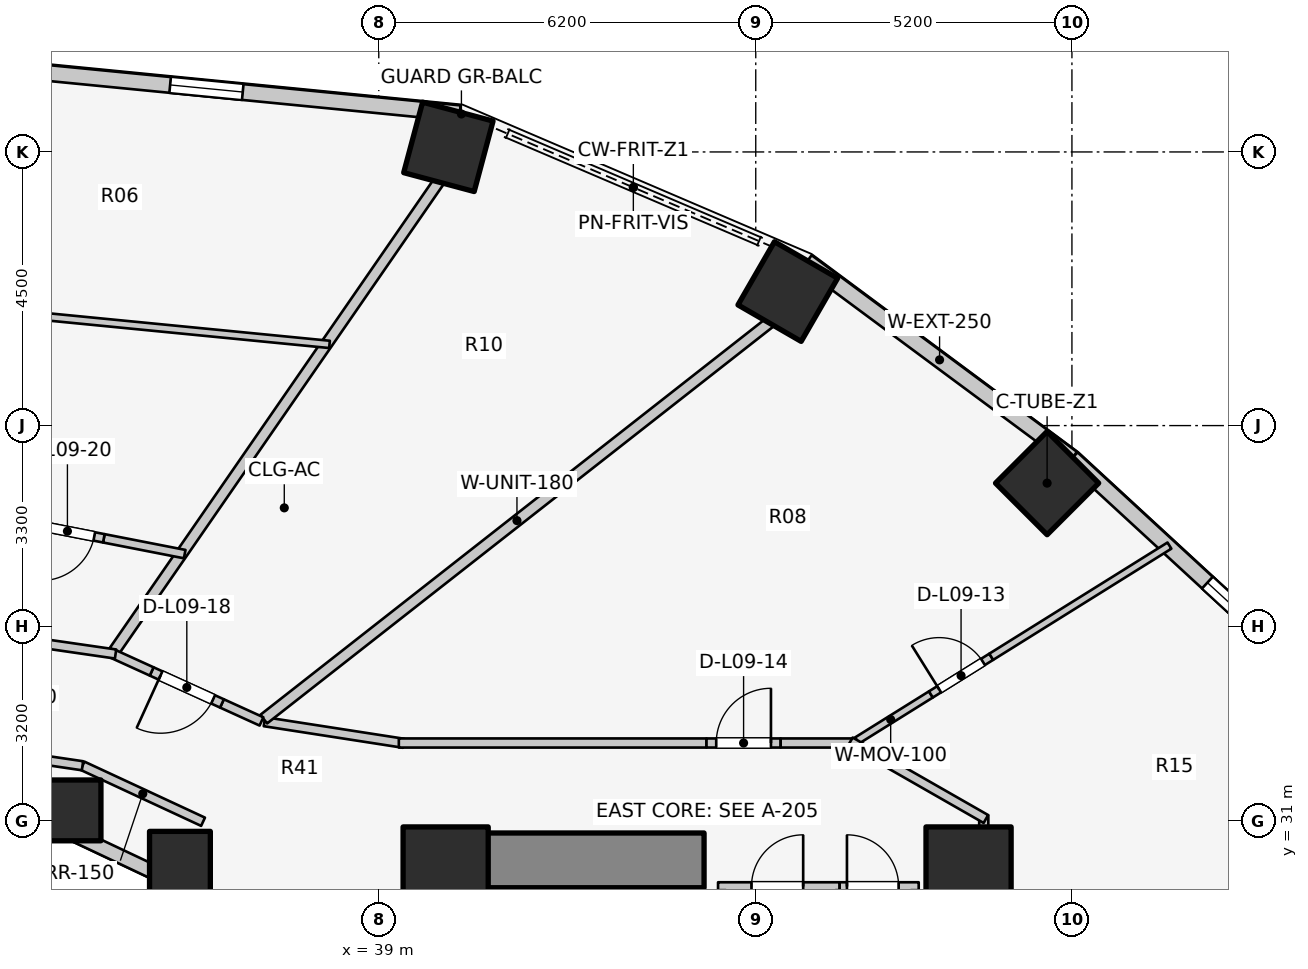
"""IFC4 building model, lengths in metres.
Left out: names, types, materials, properties, quantities, classifications, styles, units other than length and angle.
Written with IfcOpenShell. Run it as: python <this file> out.ifc"""

import sys

from ifc_helpers import new_model, si_unit, direction, frame, frame_2d, origin, origin_2d, place, context, subcontext, project, spatial, rectangle, extrude, element, fill, save


model = new_model("IFC4")
c1 = context("Model", 3, precision=1e-05, world=origin(), true_north=direction((0.0, 1.0)))
c2 = subcontext(c1, "Body", "Model", "MODEL_VIEW")
j1 = project(units=[si_unit("LENGTHUNIT", "METRE"), si_unit("PLANEANGLEUNIT", "RADIAN")], contexts=[c1])
p1 = place(None, origin())
s1 = spatial("IfcSite", under=j1, at=p1, CompositionType="ELEMENT")
p2 = place(p1, origin())
s2 = spatial("IfcBuilding", under=s1, at=p2, CompositionType="ELEMENT")
p3 = place(p2, frame((0.0, 0.0, 33.8)))
s3 = spatial("IfcBuildingStorey", under=s2, at=p3, CompositionType="ELEMENT", Elevation=33.8)
p4 = place(p3, frame((39.85, 30.35, 0.0), z_axis=(0.0, 0.0, 1.0), x_axis=(1.0, 0.0, 0.0)))
e1 = element("IfcWall", 1, at=p4, inside=s3, PredefinedType="SHEAR", context=c2, shape_type="SweptSolid", body=[
    extrude(rectangle(XDim=4.5, YDim=0.9, at=frame_2d((2.25, 0.0))), origin(), (0.0, 0.0, 1.0), 3.1),
])
for number, where, z_axis, x_axis in (
    (2, (48.7, 30.2, 0.0), (0.0, 0.0, 1.0), (1.0, 0.0, 0.0)),
    (3, (40.1, 30.2, 0.0), (0.0, 0.0, 1.0), (1.0, 0.0, 0.0)),
):
    element("IfcColumn", number, at=place(p3, frame(where, z_axis=z_axis, x_axis=x_axis)), inside=s3, PredefinedType="COLUMN", context=c2, shape_type="SweptSolid", body=[
        extrude(rectangle(XDim=1.4, YDim=1.4, at=origin_2d()), origin(), (0.0, 0.0, 1.0), 3.1),
    ])
p5 = place(p3, frame((49.992, 36.554, 0.0), z_axis=(0.0, 0.0, 1.0), x_axis=(0.707106781187, 0.707106781187, 0.0)))
e4 = element("IfcColumn", 4, at=p5, inside=s3, PredefinedType="COLUMN", context=c2, shape_type="SweptSolid", body=[
    extrude(rectangle(XDim=1.2, YDim=1.2, at=origin_2d()), origin(), (0.0, 0.0, 1.0), 3.1),
])
p6 = place(p3, frame((35.73, 30.327, 0.0), z_axis=(0.0, 0.0, 1.0), x_axis=(1.0, 0.0, 0.0)))
e5 = element("IfcColumn", 5, at=p6, inside=s3, PredefinedType="COLUMN", context=c2, shape_type="SweptSolid", body=[
    extrude(rectangle(XDim=1.0, YDim=1.0, at=origin_2d()), origin(), (0.0, 0.0, 1.0), 3.1),
])
p7 = place(p3, frame((45.727, 39.704, 0.0), z_axis=(0.0, 0.0, 1.0), x_axis=(0.5, 0.866025403784, 0.0)))
e6 = element("IfcColumn", 6, at=p7, inside=s3, PredefinedType="COLUMN", context=c2, shape_type="SweptSolid", body=[
    extrude(rectangle(XDim=1.2, YDim=1.2, at=origin_2d()), origin(), (0.0, 0.0, 1.0), 3.1),
])
p8 = place(p3, frame((33.931, 31.172, 0.0), z_axis=(0.0, 0.0, 1.0), x_axis=(1.0, 0.0, 0.0)))
e7 = element("IfcColumn", 7, at=p8, inside=s3, PredefinedType="COLUMN", context=c2, shape_type="SweptSolid", body=[
    extrude(rectangle(XDim=1.0, YDim=1.0, at=origin_2d()), origin(), (0.0, 0.0, 1.0), 3.1),
])
p9 = place(p3, frame((40.145, 42.084, 0.0), z_axis=(0.0, 0.0, 1.0), x_axis=(0.258819045103, 0.965925826289, 0.0)))
e8 = element("IfcColumn", 8, at=p9, inside=s3, PredefinedType="COLUMN", context=c2, shape_type="SweptSolid", body=[
    extrude(rectangle(XDim=1.2, YDim=1.2, at=origin_2d()), origin(), (0.0, 0.0, 1.0), 3.1),
])
p10 = place(p3, frame((37.035, 28.742, 0.0), z_axis=(0.0, 0.0, 1.0), x_axis=(-0.752576694707, 0.658504607869, 0.0)))
e9 = element("IfcWall", 9, at=p10, inside=s3, PredefinedType="STANDARD", context=c2, shape_type="SweptSolid", body=[
    extrude(rectangle(XDim=1.959, YDim=0.23, at=frame_2d((0.98, 0.0))), origin(), (0.0, 0.0, 1.0), 1.22),
])
p11 = place(p3, frame((35.56, 30.032, 0.0), z_axis=(0.0, 0.0, 1.0), x_axis=(-0.904179699603, 0.427152280606, 0.0)))
e10 = element("IfcWall", 10, at=p11, inside=s3, PredefinedType="STANDARD", context=c2, shape_type="SweptSolid", body=[
    extrude(rectangle(XDim=1.899, YDim=0.23, at=frame_2d((0.95, 0.0))), origin(), (0.0, 0.0, 1.0), 1.22),
])
p12 = place(p3, frame((33.843, 30.843, 0.0), z_axis=(0.0, 0.0, 1.0), x_axis=(-0.988901730308, 0.148571086668, 0.0)))
e11 = element("IfcWall", 11, at=p12, inside=s3, PredefinedType="STANDARD", context=c2, shape_type="SweptSolid", body=[
    extrude(rectangle(XDim=1.864, YDim=0.23, at=frame_2d((0.932, 0.0))), origin(), (0.0, 0.0, 1.0), 1.22),
])
p13 = place(p3, frame((54.194, 33.476, 0.0), z_axis=(0.0, 0.0, 1.0), x_axis=(-0.735655109293, 0.67735630223, 0.0)))
e12 = element("IfcWall", 12, at=p13, inside=s3, PredefinedType="STANDARD", context=c2, shape_type="SweptSolid", body=[
    extrude(rectangle(XDim=5.151, YDim=0.26, at=frame_2d((2.575, 0.0))), origin(), (0.0, 0.0, 1.0), 1.22),
])
p14 = place(p13, frame((0.929, 0.0, 0.15)))
e13 = element("IfcOpeningElement", 13, at=p14, cuts=e12, PredefinedType="OPENING", context=c2, shape_type="SweptSolid", body=[
    extrude(rectangle(XDim=1.2, YDim=0.9, at=frame_2d((0.6, 0.45))), frame((0.0, 0.14, 0.0), z_axis=(0.0, -1.0, 0.0), x_axis=(1.0, 0.0, 0.0)), (0.0, 0.0, 1.0), 0.28),
])
p15 = place(p3, frame((50.405, 36.965, 0.0), z_axis=(0.0, 0.0, 1.0), x_axis=(-0.803477531792, 0.595335078679, 0.0)))
e14 = element("IfcWall", 14, at=p15, inside=s3, PredefinedType="STANDARD", context=c2, shape_type="SweptSolid", body=[
    extrude(rectangle(XDim=5.43, YDim=0.26, at=frame_2d((2.715, 0.0))), origin(), (0.0, 0.0, 1.0), 1.22),
])
p16 = place(p3, frame((40.332, 42.636, 0.0), z_axis=(0.0, 0.0, 1.0), x_axis=(-0.995247718352, 0.097375454379, 0.0)))
e15 = element("IfcWall", 15, at=p16, inside=s3, PredefinedType="STANDARD", context=c2, shape_type="SweptSolid", body=[
    extrude(rectangle(XDim=8.372, YDim=0.26, at=frame_2d((4.186, 0.0))), origin(), (0.0, 0.0, 1.0), 1.22),
])
p17 = place(p16, frame((3.586, 0.0, 0.15)))
e16 = element("IfcOpeningElement", 16, at=p17, cuts=e15, PredefinedType="OPENING", context=c2, shape_type="SweptSolid", body=[
    extrude(rectangle(XDim=1.2, YDim=0.9, at=frame_2d((0.6, 0.45))), frame((0.0, 0.14, 0.0), z_axis=(0.0, -1.0, 0.0), x_axis=(1.0, 0.0, 0.0)), (0.0, 0.0, 1.0), 0.28),
])
p18 = place(p3, frame((44.58, 29.92, 0.0), z_axis=(0.0, 0.0, 1.0), x_axis=(1.0, 0.0, 0.0)))
e17 = element("IfcWall", 17, at=p18, inside=s3, PredefinedType="PLUMBINGWALL", context=c2, shape_type="SweptSolid", body=[
    extrude(rectangle(XDim=2.0, YDim=0.14, at=frame_2d((1.0, 0.0))), origin(), (0.0, 0.0, 1.0), 2.575),
])
p19 = place(p18, frame((0.55, 0.0, 0.0)))
e18 = element("IfcOpeningElement", 18, at=p19, cuts=e17, PredefinedType="OPENING", context=c2, shape_type="SweptSolid", body=[
    extrude(rectangle(XDim=0.85, YDim=2.05, at=frame_2d((0.425, 1.025))), frame((0.0, 0.08, 0.0), z_axis=(0.0, -1.0, 0.0), x_axis=(1.0, 0.0, 0.0)), (0.0, 0.0, 1.0), 0.16),
])
p20 = place(p3, frame((46.58, 29.92, 0.0), z_axis=(0.0, 0.0, 1.0), x_axis=(1.0, 0.0, 0.0)))
e19 = element("IfcWall", 19, at=p20, inside=s3, PredefinedType="PLUMBINGWALL", context=c2, shape_type="SweptSolid", body=[
    extrude(rectangle(XDim=1.3, YDim=0.14, at=frame_2d((0.65, 0.0))), origin(), (0.0, 0.0, 1.0), 2.575),
])
p21 = place(p20, frame((0.12, 0.0, 0.0)))
e20 = element("IfcOpeningElement", 20, at=p21, cuts=e19, PredefinedType="OPENING", context=c2, shape_type="SweptSolid", body=[
    extrude(rectangle(XDim=0.85, YDim=2.05, at=frame_2d((0.425, 1.025))), frame((0.0, 0.08, 0.0), z_axis=(0.0, -1.0, 0.0), x_axis=(1.0, 0.0, 0.0)), (0.0, 0.0, 1.0), 0.16),
])
p22 = place(p3, frame((36.11, 30.985, 0.0), z_axis=(0.0, 0.0, 1.0), x_axis=(-0.906943449489, 0.421252393975, 0.0)))
e21 = element("IfcWall", 21, at=p22, inside=s3, PredefinedType="PARTITIONING", context=c2, shape_type="SweptSolid", body=[
    extrude(rectangle(XDim=2.186, YDim=0.15, at=frame_2d((1.093, 0.0))), origin(), (0.0, 0.0, 1.0), 1.957),
])
p23 = place(p3, frame((34.127, 31.906, 0.0), z_axis=(0.0, 0.0, 1.0), x_axis=(-0.989268584896, 0.146108408166, 0.0)))
e22 = element("IfcWall", 22, at=p23, inside=s3, PredefinedType="PARTITIONING", context=c2, shape_type="SweptSolid", body=[
    extrude(rectangle(XDim=2.151, YDim=0.15, at=frame_2d((1.075, 0.0))), origin(), (0.0, 0.0, 1.0), 1.957),
])
p24 = place(p3, frame((48.95, 29.8, 0.0), z_axis=(0.0, 0.0, 1.0), x_axis=(0.0, 1.0, 0.0)))
e23 = element("IfcWall", 23, at=p24, inside=s3, PredefinedType="PARTITIONING", context=c2, shape_type="SweptSolid", body=[
    extrude(rectangle(XDim=1.29, YDim=0.15, at=frame_2d((0.645, 0.0))), origin(), (0.0, 0.0, 1.0), 1.22),
])
p25 = place(p3, frame((46.758, 32.253, 0.0), z_axis=(0.0, 0.0, 1.0), x_axis=(0.848437888741, 0.529294954585, 0.0)))
e24 = element("IfcWall", 24, at=p25, inside=s3, PredefinedType="MOVABLE", context=c2, shape_type="SweptSolid", body=[
    extrude(rectangle(XDim=1.559, YDim=0.12, at=frame_2d((0.78, 0.0))), origin(), (0.0, 0.0, 1.0), 2.575),
])
p26 = place(p3, frame((48.08, 33.079, 0.0), z_axis=(0.0, 0.0, 1.0), x_axis=(0.848396621262, 0.529361098903, 0.0)))
e25 = element("IfcWall", 25, at=p26, inside=s3, PredefinedType="MOVABLE", context=c2, shape_type="SweptSolid", body=[
    extrude(rectangle(XDim=1.17, YDim=0.12, at=frame_2d((0.585, 0.0))), origin(), (0.0, 0.0, 1.0), 2.11),
])
p27 = place(p26, frame((0.16, 0.0, 0.0)))
e26 = element("IfcOpeningElement", 26, at=p27, cuts=e25, PredefinedType="OPENING", context=c2, shape_type="SweptSolid", body=[
    extrude(rectangle(XDim=0.85, YDim=2.05, at=frame_2d((0.425, 1.025))), frame((0.0, 0.07, 0.0), z_axis=(0.0, -1.0, 0.0), x_axis=(1.0, 0.0, 0.0)), (0.0, 0.0, 1.0), 0.14),
])
p28 = place(p3, frame((49.073, 33.698, 0.0), z_axis=(0.0, 0.0, 1.0), x_axis=(0.848407059389, 0.529344369555, 0.0)))
e27 = element("IfcWall", 27, at=p28, inside=s3, PredefinedType="MOVABLE", context=c2, shape_type="SweptSolid", body=[
    extrude(rectangle(XDim=3.454, YDim=0.12, at=frame_2d((1.727, 0.0))), origin(), (0.0, 0.0, 1.0), 1.22),
])
p29 = place(p3, frame((37.119, 32.631, 0.0), z_axis=(0.0, 0.0, 1.0), x_axis=(0.988184633586, -0.153268163508, 0.0)))
e28 = element("IfcWall", 28, at=p29, inside=s3, PredefinedType="PARTITIONING", context=c2, shape_type="SweptSolid", body=[
    extrude(rectangle(XDim=2.318, YDim=0.15, at=frame_2d((1.159, 0.0))), origin(), (0.0, 0.0, 1.0), 1.957),
])
p30 = place(p3, frame((39.33, 32.28, 0.0), z_axis=(0.0, 0.0, 1.0), x_axis=(1.0, 0.0, 0.0)))
e29 = element("IfcWall", 29, at=p30, inside=s3, PredefinedType="PARTITIONING", context=c2, shape_type="SweptSolid", body=[
    extrude(rectangle(XDim=5.06, YDim=0.15, at=frame_2d((2.53, 0.0))), origin(), (0.0, 0.0, 1.0), 1.957),
])
p31 = place(p3, frame((44.39, 32.28, 0.0), z_axis=(0.0, 0.0, 1.0), x_axis=(1.0, 0.0, 0.0)))
e30 = element("IfcWall", 30, at=p31, inside=s3, PredefinedType="PARTITIONING", context=c2, shape_type="SweptSolid", body=[
    extrude(rectangle(XDim=1.22, YDim=0.15, at=frame_2d((0.61, 0.0))), origin(), (0.0, 0.0, 1.0), 2.575),
])
p32 = place(p31, frame((0.16, 0.0, 0.0)))
e31 = element("IfcOpeningElement", 31, at=p32, cuts=e30, PredefinedType="OPENING", context=c2, shape_type="SweptSolid", body=[
    extrude(rectangle(XDim=0.9, YDim=2.1, at=frame_2d((0.45, 1.05))), frame((0.0, 0.085, 0.0), z_axis=(0.0, -1.0, 0.0), x_axis=(1.0, 0.0, 0.0)), (0.0, 0.0, 1.0), 0.17),
])
p33 = place(p3, frame((45.61, 32.28, 0.0), z_axis=(0.0, 0.0, 1.0), x_axis=(1.0, 0.0, 0.0)))
e32 = element("IfcWall", 32, at=p33, inside=s3, PredefinedType="PARTITIONING", context=c2, shape_type="SweptSolid", body=[
    extrude(rectangle(XDim=1.24, YDim=0.15, at=frame_2d((0.62, 0.0))), origin(), (0.0, 0.0, 1.0), 2.575),
])
p34 = place(p3, frame((46.757, 32.305, 0.0), z_axis=(0.0, 0.0, 1.0), x_axis=(0.867991349648, -0.496579315857, 0.0)))
e33 = element("IfcWall", 33, at=p34, inside=s3, PredefinedType="PARTITIONING", context=c2, shape_type="SweptSolid", body=[
    extrude(rectangle(XDim=2.567, YDim=0.15, at=frame_2d((1.283, 0.0))), origin(), (0.0, 0.0, 1.0), 1.22),
])
p35 = place(p3, frame((37.108, 32.673, 0.0), z_axis=(0.0, 0.0, 1.0), x_axis=(0.78700868866, 0.616941912966, 0.0)))
e34 = element("IfcWall", 34, at=p35, inside=s3, PredefinedType="PARTITIONING", context=c2, shape_type="SweptSolid", body=[
    extrude(rectangle(XDim=10.583, YDim=0.18, at=frame_2d((5.292, 0.0))), origin(), (0.0, 0.0, 1.0), 1.957),
])
p36 = place(p3, frame((34.653, 33.796, 0.0), z_axis=(0.0, 0.0, 1.0), x_axis=(0.568631434817, 0.822592421153, 0.0)))
e35 = element("IfcWall", 35, at=p36, inside=s3, PredefinedType="PARTITIONING", context=c2, shape_type="SweptSolid", body=[
    extrude(rectangle(XDim=9.394, YDim=0.18, at=frame_2d((4.697, 0.0))), origin(), (0.0, 0.0, 1.0), 1.957),
])
p37 = place(p3, frame((37.071, 32.635, 0.0), z_axis=(0.0, 0.0, 1.0), x_axis=(-0.910167389119, 0.414240659261, 0.0)))
e36 = element("IfcWall", 36, at=p37, inside=s3, PredefinedType="PARTITIONING", context=c2, shape_type="SweptSolid", body=[
    extrude(rectangle(XDim=0.714, YDim=0.15, at=frame_2d((0.357, 0.0))), origin(), (0.0, 0.0, 1.0), 2.575),
])
p38 = place(p3, frame((36.421, 32.931, 0.0), z_axis=(0.0, 0.0, 1.0), x_axis=(-0.910168885926, 0.414237370469, 0.0)))
e37 = element("IfcWall", 37, at=p38, inside=s3, PredefinedType="PARTITIONING", context=c2, shape_type="SweptSolid", body=[
    extrude(rectangle(XDim=1.27, YDim=0.15, at=frame_2d((0.635, 0.0))), origin(), (0.0, 0.0, 1.0), 2.16),
])
p39 = place(p38, frame((0.16, 0.0, 0.0)))
e38 = element("IfcOpeningElement", 38, at=p39, cuts=e37, PredefinedType="OPENING", context=c2, shape_type="SweptSolid", body=[
    extrude(rectangle(XDim=0.95, YDim=2.1, at=frame_2d((0.475, 1.05))), frame((0.0, 0.085, 0.0), z_axis=(0.0, -1.0, 0.0), x_axis=(1.0, 0.0, 0.0)), (0.0, 0.0, 1.0), 0.17),
])
p40 = place(p3, frame((35.265, 33.457, 0.0), z_axis=(0.0, 0.0, 1.0), x_axis=(-0.910237621284, 0.414086310809, 0.0)))
e39 = element("IfcWall", 39, at=p40, inside=s3, PredefinedType="PARTITIONING", context=c2, shape_type="SweptSolid", body=[
    extrude(rectangle(XDim=0.714, YDim=0.15, at=frame_2d((0.357, 0.0))), origin(), (0.0, 0.0, 1.0), 1.957),
])
p41 = place(p3, frame((38.19, 38.835, 0.0), z_axis=(0.0, 0.0, 1.0), x_axis=(-0.995257435484, 0.097276087063, 0.0)))
e40 = element("IfcWall", 40, at=p41, inside=s3, PredefinedType="MOVABLE", context=c2, shape_type="SweptSolid", body=[
    extrude(rectangle(XDim=6.229, YDim=0.12, at=frame_2d((3.115, 0.0))), origin(), (0.0, 0.0, 1.0), 1.957),
])
p42 = place(p3, frame((34.671, 33.744, 0.0), z_axis=(0.0, 0.0, 1.0), x_axis=(-0.989701115085, 0.143149232617, 0.0)))
e41 = element("IfcWall", 41, at=p42, inside=s3, PredefinedType="PARTITIONING", context=c2, shape_type="SweptSolid", body=[
    extrude(rectangle(XDim=2.749, YDim=0.15, at=frame_2d((1.375, 0.0))), origin(), (0.0, 0.0, 1.0), 1.957),
])
p43 = place(p3, frame((35.808, 35.386, 0.0), z_axis=(0.0, 0.0, 1.0), x_axis=(-0.981484809036, 0.191539994861, 0.0)))
e42 = element("IfcWall", 42, at=p43, inside=s3, PredefinedType="PLUMBINGWALL", context=c2, shape_type="SweptSolid", body=[
    extrude(rectangle(XDim=1.355, YDim=0.14, at=frame_2d((0.677, 0.0))), origin(), (0.0, 0.0, 1.0), 2.575),
])
p44 = place(p3, frame((34.478, 35.646, 0.0), z_axis=(0.0, 0.0, 1.0), x_axis=(-0.981455717174, 0.191689006535, 0.0)))
e43 = element("IfcWall", 43, at=p44, inside=s3, PredefinedType="PLUMBINGWALL", context=c2, shape_type="SweptSolid", body=[
    extrude(rectangle(XDim=1.22, YDim=0.14, at=frame_2d((0.61, 0.0))), origin(), (0.0, 0.0, 1.0), 2.575),
])
p45 = place(p44, frame((0.16, 0.0, 0.0)))
e44 = element("IfcOpeningElement", 44, at=p45, cuts=e43, PredefinedType="OPENING", context=c2, shape_type="SweptSolid", body=[
    extrude(rectangle(XDim=0.9, YDim=2.1, at=frame_2d((0.45, 1.05))), frame((0.0, 0.08, 0.0), z_axis=(0.0, -1.0, 0.0), x_axis=(1.0, 0.0, 0.0)), (0.0, 0.0, 1.0), 0.16),
])
p46 = place(p14, origin())
e45 = element("IfcWindow", 45, at=p46, inside=s3, PartitioningType="SINGLE_PANEL", PredefinedType="WINDOW", context=c2, shape_type="SweptSolid", body=[
    extrude(rectangle(XDim=1.2, YDim=0.9, at=frame_2d((0.6, 0.45))), frame((0.0, 0.03, 0.0), z_axis=(0.0, -1.0, 0.0), x_axis=(1.0, 0.0, 0.0)), (0.0, 0.0, 1.0), 0.06),
])
fill(e13, e45)
p47 = place(p17, origin())
e46 = element("IfcWindow", 46, at=p47, inside=s3, PartitioningType="SINGLE_PANEL", PredefinedType="WINDOW", context=c2, shape_type="SweptSolid", body=[
    extrude(rectangle(XDim=1.2, YDim=0.9, at=frame_2d((0.6, 0.45))), frame((0.0, 0.03, 0.0), z_axis=(0.0, -1.0, 0.0), x_axis=(1.0, 0.0, 0.0)), (0.0, 0.0, 1.0), 0.06),
])
fill(e16, e46)
p48 = place(p19, origin())
e47 = element("IfcDoor", 47, at=p48, inside=s3, OperationType="SINGLE_SWING_RIGHT", PredefinedType="DOOR", context=c2, shape_type="SweptSolid", body=[
    extrude(rectangle(XDim=0.85, YDim=2.05, at=frame_2d((0.425, 1.025))), frame((0.0, 0.025, 0.0), z_axis=(0.0, -1.0, 0.0), x_axis=(1.0, 0.0, 0.0)), (0.0, 0.0, 1.0), 0.05),
])
fill(e18, e47)
p49 = place(p21, origin())
e48 = element("IfcDoor", 48, at=p49, inside=s3, OperationType="SINGLE_SWING_LEFT", PredefinedType="DOOR", context=c2, shape_type="SweptSolid", body=[
    extrude(rectangle(XDim=0.85, YDim=2.05, at=frame_2d((0.425, 1.025))), frame((0.0, 0.025, 0.0), z_axis=(0.0, -1.0, 0.0), x_axis=(1.0, 0.0, 0.0)), (0.0, 0.0, 1.0), 0.05),
])
fill(e20, e48)
p50 = place(p27, origin())
e49 = element("IfcDoor", 49, at=p50, inside=s3, OperationType="SINGLE_SWING_LEFT", PredefinedType="DOOR", context=c2, shape_type="SweptSolid", body=[
    extrude(rectangle(XDim=0.85, YDim=2.05, at=frame_2d((0.425, 1.025))), frame((0.0, 0.025, 0.0), z_axis=(0.0, -1.0, 0.0), x_axis=(1.0, 0.0, 0.0)), (0.0, 0.0, 1.0), 0.05),
])
fill(e26, e49)
p51 = place(p32, origin())
e50 = element("IfcDoor", 50, at=p51, inside=s3, OperationType="SINGLE_SWING_RIGHT", PredefinedType="DOOR", context=c2, shape_type="SweptSolid", body=[
    extrude(rectangle(XDim=0.9, YDim=2.1, at=frame_2d((0.45, 1.05))), frame((0.0, 0.025, 0.0), z_axis=(0.0, -1.0, 0.0), x_axis=(1.0, 0.0, 0.0)), (0.0, 0.0, 1.0), 0.05),
])
fill(e31, e50)
p52 = place(p39, origin())
e51 = element("IfcDoor", 51, at=p52, inside=s3, OperationType="SINGLE_SWING_RIGHT", PredefinedType="DOOR", context=c2, shape_type="SweptSolid", body=[
    extrude(rectangle(XDim=0.95, YDim=2.1, at=frame_2d((0.475, 1.05))), frame((0.0, 0.025, 0.0), z_axis=(0.0, -1.0, 0.0), x_axis=(1.0, 0.0, 0.0)), (0.0, 0.0, 1.0), 0.05),
])
fill(e38, e51)
p53 = place(p45, origin())
e52 = element("IfcDoor", 52, at=p53, inside=s3, OperationType="SINGLE_SWING_RIGHT", PredefinedType="DOOR", context=c2, shape_type="SweptSolid", body=[
    extrude(rectangle(XDim=0.9, YDim=2.1, at=frame_2d((0.45, 1.05))), frame((0.0, 0.025, 0.0), z_axis=(0.0, -1.0, 0.0), x_axis=(1.0, 0.0, 0.0)), (0.0, 0.0, 1.0), 0.05),
])
fill(e44, e52)
save(model, sys.argv[1])
